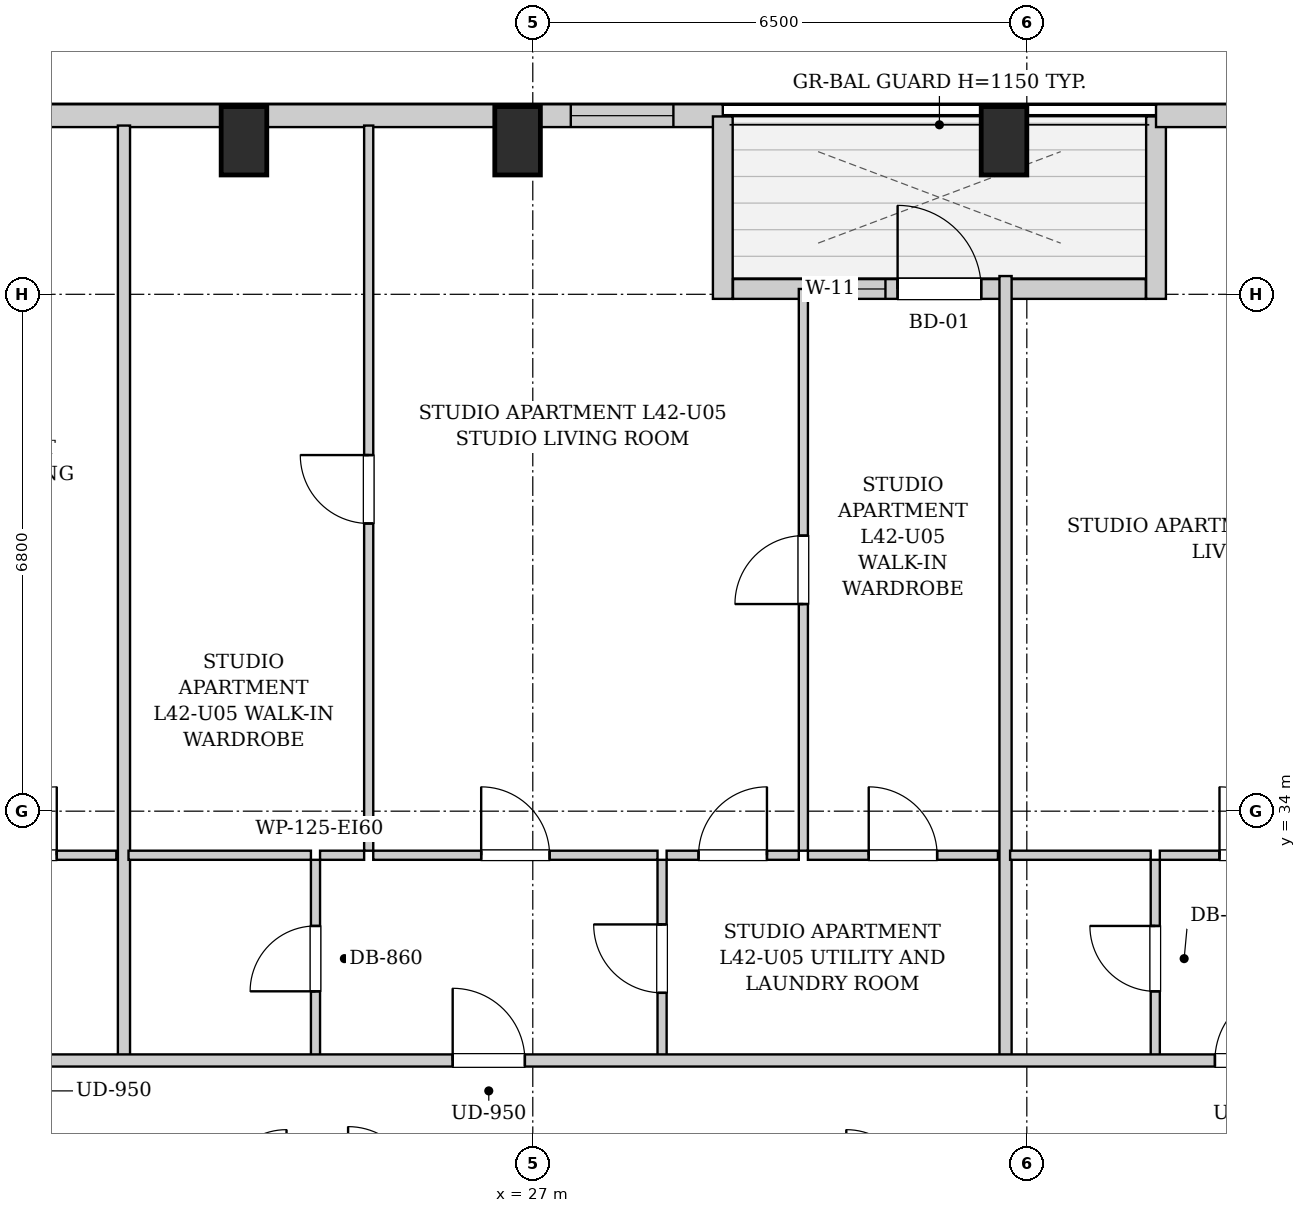
"""IFC4 building model, lengths in metres.
Left out: names, types, materials, properties, quantities, classifications, styles, units other than length and angle.
Written with IfcOpenShell. Run it as: python <this file> out.ifc"""

import sys

from ifc_helpers import new_model, si_unit, direction, frame, frame_2d, origin, origin_2d, place, context, subcontext, project, spatial, rectangle, extrude, element, fill, save


model = new_model("IFC4")
c1 = context("Model", 3, precision=1e-05, world=origin(), true_north=direction((0.0, 1.0)))
c2 = subcontext(c1, "Body", "Model", "MODEL_VIEW")
j1 = project(units=[si_unit("LENGTHUNIT", "METRE"), si_unit("PLANEANGLEUNIT", "RADIAN")], contexts=[c1])
p1 = place(None, origin())
s1 = spatial("IfcSite", under=j1, at=p1, CompositionType="ELEMENT")
p2 = place(p1, origin())
s2 = spatial("IfcBuilding", under=s1, at=p2, CompositionType="ELEMENT")
p3 = place(p2, frame((0.0, 0.0, 147.15)))
s3 = spatial("IfcBuildingStorey", under=s2, at=p3, CompositionType="ELEMENT", Elevation=147.15)
for number, where, z_axis, x_axis in (
    (1, (23.2, 42.82, 0.0), (0.0, 0.0, 1.0), (1.0, 0.0, 0.0)),
    (2, (26.8, 42.82, 0.0), (0.0, 0.0, 1.0), (1.0, 0.0, 0.0)),
    (3, (33.2, 42.82, 0.0), (0.0, 0.0, 1.0), (1.0, 0.0, 0.0)),
):
    element("IfcColumn", number, at=place(p3, frame(where, z_axis=z_axis, x_axis=x_axis)), inside=s3, PredefinedType="COLUMN", context=c2, shape_type="SweptSolid", body=[
        extrude(rectangle(XDim=0.6, YDim=0.9, at=origin_2d()), origin(), (0.0, 0.0, 1.0), 3.25),
    ])
p4 = place(p3, frame((10.0, 43.15, 0.0), z_axis=(0.0, 0.0, 1.0), x_axis=(1.0, 0.0, 0.0)))
e4 = element("IfcWall", 4, at=p4, inside=s3, PredefinedType="SOLIDWALL", context=c2, shape_type="SweptSolid", body=[
    extrude(rectangle(XDim=19.5, YDim=0.3, at=frame_2d((9.75, 0.0))), origin(), (0.0, 0.0, 1.0), 2.99),
])
p5 = place(p4, frame((2.39, 0.0, 0.55)))
e5 = element("IfcOpeningElement", 5, at=p5, cuts=e4, PredefinedType="OPENING", context=c2, shape_type="SweptSolid", body=[
    extrude(rectangle(XDim=1.35, YDim=1.2, at=frame_2d((0.675, 0.6))), frame((0.0, 0.16, 0.0), z_axis=(0.0, -1.0, 0.0), x_axis=(1.0, 0.0, 0.0)), (0.0, 0.0, 1.0), 0.32),
])
p6 = place(p4, frame((4.66, 0.0, 0.55)))
e6 = element("IfcOpeningElement", 6, at=p6, cuts=e4, PredefinedType="OPENING", context=c2, shape_type="SweptSolid", body=[
    extrude(rectangle(XDim=1.35, YDim=1.2, at=frame_2d((0.675, 0.6))), frame((0.0, 0.16, 0.0), z_axis=(0.0, -1.0, 0.0), x_axis=(1.0, 0.0, 0.0)), (0.0, 0.0, 1.0), 0.32),
])
p7 = place(p4, frame((8.625, 0.0, 0.55)))
e7 = element("IfcOpeningElement", 7, at=p7, cuts=e4, PredefinedType="OPENING", context=c2, shape_type="SweptSolid", body=[
    extrude(rectangle(XDim=1.35, YDim=1.2, at=frame_2d((0.675, 0.6))), frame((0.0, 0.16, 0.0), z_axis=(0.0, -1.0, 0.0), x_axis=(1.0, 0.0, 0.0)), (0.0, 0.0, 1.0), 0.32),
])
p8 = place(p4, frame((17.5, 0.0, 0.55)))
e8 = element("IfcOpeningElement", 8, at=p8, cuts=e4, PredefinedType="OPENING", context=c2, shape_type="SweptSolid", body=[
    extrude(rectangle(XDim=1.35, YDim=1.2, at=frame_2d((0.675, 0.6))), frame((0.0, 0.16, 0.0), z_axis=(0.0, -1.0, 0.0), x_axis=(1.0, 0.0, 0.0)), (0.0, 0.0, 1.0), 0.32),
])
p9 = place(p3, frame((29.5, 43.14, 0.0), z_axis=(0.0, 0.0, 1.0), x_axis=(0.0, -1.0, 0.0)))
e9 = element("IfcWall", 9, at=p9, inside=s3, PredefinedType="SOLIDWALL", context=c2, shape_type="SweptSolid", body=[
    extrude(rectangle(XDim=2.4, YDim=0.26, at=frame_2d((1.2, 0.0))), origin(), (0.0, 0.0, 1.0), 2.99),
])
p10 = place(p3, frame((29.634, 40.87, 0.0), z_axis=(0.0, 0.0, 1.0), x_axis=(1.0, 0.0, 0.0)))
e10 = element("IfcWall", 10, at=p10, inside=s3, PredefinedType="SOLIDWALL", context=c2, shape_type="SweptSolid", body=[
    extrude(rectangle(XDim=5.432, YDim=0.26, at=frame_2d((2.716, 0.0))), origin(), (0.0, 0.0, 1.0), 2.99),
])
p11 = place(p10, frame((2.166, 0.0, 0.0)))
e11 = element("IfcOpeningElement", 11, at=p11, cuts=e10, PredefinedType="OPENING", context=c2, shape_type="SweptSolid", body=[
    extrude(rectangle(XDim=1.1, YDim=2.0, at=frame_2d((0.55, 1.0))), frame((0.0, 0.14, 0.0), z_axis=(0.0, -1.0, 0.0), x_axis=(1.0, 0.0, 0.0)), (0.0, 0.0, 1.0), 0.28),
])
p12 = place(p10, frame((1.156, 0.0, 0.55)))
e12 = element("IfcOpeningElement", 12, at=p12, cuts=e10, PredefinedType="OPENING", context=c2, shape_type="SweptSolid", body=[
    extrude(rectangle(XDim=0.85, YDim=1.2, at=frame_2d((0.425, 0.6))), frame((0.0, 0.14, 0.0), z_axis=(0.0, -1.0, 0.0), x_axis=(1.0, 0.0, 0.0)), (0.0, 0.0, 1.0), 0.28),
])
p13 = place(p3, frame((35.2, 40.74, 0.0), z_axis=(0.0, 0.0, 1.0), x_axis=(0.0, 1.0, 0.0)))
e13 = element("IfcWall", 13, at=p13, inside=s3, PredefinedType="SOLIDWALL", context=c2, shape_type="SweptSolid", body=[
    extrude(rectangle(XDim=2.4, YDim=0.26, at=frame_2d((1.2, 0.0))), origin(), (0.0, 0.0, 1.0), 2.99),
])
p14 = place(p3, frame((35.2, 43.15, 0.0), z_axis=(0.0, 0.0, 1.0), x_axis=(1.0, 0.0, 0.0)))
e14 = element("IfcWall", 14, at=p14, inside=s3, PredefinedType="SOLIDWALL", context=c2, shape_type="SweptSolid", body=[
    extrude(rectangle(XDim=2.6, YDim=0.3, at=frame_2d((1.3, 0.0))), origin(), (0.0, 0.0, 1.0), 2.99),
])
p15 = place(p3, frame((19.054, 33.42, 0.0), z_axis=(0.0, 0.0, 1.0), x_axis=(1.0, 0.0, 0.0)))
e15 = element("IfcWall", 15, at=p15, inside=s3, PredefinedType="PARTITIONING", context=c2, shape_type="SweptSolid", body=[
    extrude(rectangle(XDim=2.467, YDim=0.12, at=frame_2d((1.233, 0.0))), origin(), (0.0, 0.0, 1.0), 2.99),
])
p16 = place(p15, frame((0.783, 0.0, 0.0)))
e16 = element("IfcOpeningElement", 16, at=p16, cuts=e15, PredefinedType="OPENING", context=c2, shape_type="SweptSolid", body=[
    extrude(rectangle(XDim=0.9, YDim=2.05, at=frame_2d((0.45, 1.025))), frame((0.0, 0.07, 0.0), z_axis=(0.0, -1.0, 0.0), x_axis=(1.0, 0.0, 0.0)), (0.0, 0.0, 1.0), 0.14),
])
p17 = place(p3, frame((21.621, 30.76, 0.0), z_axis=(0.0, 0.0, 1.0), x_axis=(0.0, 1.0, 0.0)))
e17 = element("IfcWall", 17, at=p17, inside=s3, PredefinedType="PARTITIONING", context=c2, shape_type="SweptSolid", body=[
    extrude(rectangle(XDim=12.26, YDim=0.16, at=frame_2d((6.13, 0.0))), origin(), (0.0, 0.0, 1.0), 2.99),
])
p18 = place(p3, frame((24.141, 30.76, 0.0), z_axis=(0.0, 0.0, 1.0), x_axis=(0.0, 1.0, 0.0)))
e18 = element("IfcWall", 18, at=p18, inside=s3, PredefinedType="PARTITIONING", context=c2, shape_type="SweptSolid", body=[
    extrude(rectangle(XDim=2.6, YDim=0.12, at=frame_2d((1.3, 0.0))), origin(), (0.0, 0.0, 1.0), 2.99),
])
p19 = place(p18, frame((0.87, 0.0, 0.0)))
e19 = element("IfcOpeningElement", 19, at=p19, cuts=e18, PredefinedType="OPENING", context=c2, shape_type="SweptSolid", body=[
    extrude(rectangle(XDim=0.86, YDim=2.05, at=frame_2d((0.43, 1.025))), frame((0.0, 0.07, 0.0), z_axis=(0.0, -1.0, 0.0), x_axis=(1.0, 0.0, 0.0)), (0.0, 0.0, 1.0), 0.14),
])
p20 = place(p3, frame((21.681, 33.42, 0.0), z_axis=(0.0, 0.0, 1.0), x_axis=(1.0, 0.0, 0.0)))
e20 = element("IfcWall", 20, at=p20, inside=s3, PredefinedType="PARTITIONING", context=c2, shape_type="SweptSolid", body=[
    extrude(rectangle(XDim=2.4, YDim=0.12, at=frame_2d((1.2, 0.0))), origin(), (0.0, 0.0, 1.0), 2.99),
])
p21 = place(p3, frame((28.701, 30.76, 0.0), z_axis=(0.0, 0.0, 1.0), x_axis=(0.0, 1.0, 0.0)))
e21 = element("IfcWall", 21, at=p21, inside=s3, PredefinedType="PARTITIONING", context=c2, shape_type="SweptSolid", body=[
    extrude(rectangle(XDim=2.6, YDim=0.12, at=frame_2d((1.3, 0.0))), origin(), (0.0, 0.0, 1.0), 2.99),
])
p22 = place(p21, frame((0.85, 0.0, 0.0)))
e22 = element("IfcOpeningElement", 22, at=p22, cuts=e21, PredefinedType="OPENING", context=c2, shape_type="SweptSolid", body=[
    extrude(rectangle(XDim=0.9, YDim=2.05, at=frame_2d((0.45, 1.025))), frame((0.0, 0.07, 0.0), z_axis=(0.0, -1.0, 0.0), x_axis=(1.0, 0.0, 0.0)), (0.0, 0.0, 1.0), 0.14),
])
p23 = place(p3, frame((24.201, 33.42, 0.0), z_axis=(0.0, 0.0, 1.0), x_axis=(1.0, 0.0, 0.0)))
e23 = element("IfcWall", 23, at=p23, inside=s3, PredefinedType="PARTITIONING", context=c2, shape_type="SweptSolid", body=[
    extrude(rectangle(XDim=0.58, YDim=0.12, at=frame_2d((0.29, 0.0))), origin(), (0.0, 0.0, 1.0), 2.99),
])
p24 = place(p3, frame((24.901, 33.42, 0.0), z_axis=(0.0, 0.0, 1.0), x_axis=(1.0, 0.0, 0.0)))
e24 = element("IfcWall", 24, at=p24, inside=s3, PredefinedType="PARTITIONING", context=c2, shape_type="SweptSolid", body=[
    extrude(rectangle(XDim=3.74, YDim=0.12, at=frame_2d((1.87, 0.0))), origin(), (0.0, 0.0, 1.0), 2.99),
])
p25 = place(p24, frame((1.42, 0.0, 0.0)))
e25 = element("IfcOpeningElement", 25, at=p25, cuts=e24, PredefinedType="OPENING", context=c2, shape_type="SweptSolid", body=[
    extrude(rectangle(XDim=0.9, YDim=2.05, at=frame_2d((0.45, 1.025))), frame((0.0, 0.07, 0.0), z_axis=(0.0, -1.0, 0.0), x_axis=(1.0, 0.0, 0.0)), (0.0, 0.0, 1.0), 0.14),
])
p26 = place(p3, frame((28.761, 33.42, 0.0), z_axis=(0.0, 0.0, 1.0), x_axis=(1.0, 0.0, 0.0)))
e26 = element("IfcWall", 26, at=p26, inside=s3, PredefinedType="PARTITIONING", context=c2, shape_type="SweptSolid", body=[
    extrude(rectangle(XDim=1.739, YDim=0.12, at=frame_2d((0.87, 0.0))), origin(), (0.0, 0.0, 1.0), 2.99),
])
p27 = place(p26, frame((0.42, 0.0, 0.0)))
e27 = element("IfcOpeningElement", 27, at=p27, cuts=e26, PredefinedType="OPENING", context=c2, shape_type="SweptSolid", body=[
    extrude(rectangle(XDim=0.9, YDim=2.05, at=frame_2d((0.45, 1.025))), frame((0.0, 0.07, 0.0), z_axis=(0.0, -1.0, 0.0), x_axis=(1.0, 0.0, 0.0)), (0.0, 0.0, 1.0), 0.14),
])
p28 = place(p3, frame((30.62, 33.42, 0.0), z_axis=(0.0, 0.0, 1.0), x_axis=(1.0, 0.0, 0.0)))
e28 = element("IfcWall", 28, at=p28, inside=s3, PredefinedType="PARTITIONING", context=c2, shape_type="SweptSolid", body=[
    extrude(rectangle(XDim=2.5, YDim=0.12, at=frame_2d((1.25, 0.0))), origin(), (0.0, 0.0, 1.0), 2.99),
])
p29 = place(p28, frame((0.8, 0.0, 0.0)))
e29 = element("IfcOpeningElement", 29, at=p29, cuts=e28, PredefinedType="OPENING", context=c2, shape_type="SweptSolid", body=[
    extrude(rectangle(XDim=0.9, YDim=2.05, at=frame_2d((0.45, 1.025))), frame((0.0, 0.07, 0.0), z_axis=(0.0, -1.0, 0.0), x_axis=(1.0, 0.0, 0.0)), (0.0, 0.0, 1.0), 0.14),
])
p30 = place(p3, frame((24.841, 33.48, 0.0), z_axis=(0.0, 0.0, 1.0), x_axis=(0.0, 1.0, 0.0)))
e30 = element("IfcWall", 30, at=p30, inside=s3, PredefinedType="PARTITIONING", context=c2, shape_type="SweptSolid", body=[
    extrude(rectangle(XDim=9.54, YDim=0.12, at=frame_2d((4.77, 0.0))), origin(), (0.0, 0.0, 1.0), 2.99),
])
p31 = place(p30, frame((4.305, 0.0, 0.0)))
e31 = element("IfcOpeningElement", 31, at=p31, cuts=e30, PredefinedType="OPENING", context=c2, shape_type="SweptSolid", body=[
    extrude(rectangle(XDim=0.9, YDim=2.05, at=frame_2d((0.45, 1.025))), frame((0.0, 0.07, 0.0), z_axis=(0.0, -1.0, 0.0), x_axis=(1.0, 0.0, 0.0)), (0.0, 0.0, 1.0), 0.14),
])
p32 = place(p3, frame((30.56, 33.48, 0.0), z_axis=(0.0, 0.0, 1.0), x_axis=(0.0, 1.0, 0.0)))
e32 = element("IfcWall", 32, at=p32, inside=s3, PredefinedType="PARTITIONING", context=c2, shape_type="SweptSolid", body=[
    extrude(rectangle(XDim=7.39, YDim=0.12, at=frame_2d((3.695, 0.0))), origin(), (0.0, 0.0, 1.0), 2.99),
])
p33 = place(p32, frame((3.245, 0.0, 0.0)))
e33 = element("IfcOpeningElement", 33, at=p33, cuts=e32, PredefinedType="OPENING", context=c2, shape_type="SweptSolid", body=[
    extrude(rectangle(XDim=0.9, YDim=2.05, at=frame_2d((0.45, 1.025))), frame((0.0, 0.07, 0.0), z_axis=(0.0, -1.0, 0.0), x_axis=(1.0, 0.0, 0.0)), (0.0, 0.0, 1.0), 0.14),
])
p34 = place(p3, frame((33.22, 30.76, 0.0), z_axis=(0.0, 0.0, 1.0), x_axis=(0.0, 1.0, 0.0)))
e34 = element("IfcWall", 34, at=p34, inside=s3, PredefinedType="PARTITIONING", context=c2, shape_type="SweptSolid", body=[
    extrude(rectangle(XDim=10.28, YDim=0.16, at=frame_2d((5.14, 0.0))), origin(), (0.0, 0.0, 1.0), 2.442),
])
p35 = place(p3, frame((35.19, 30.76, 0.0), z_axis=(0.0, 0.0, 1.0), x_axis=(0.0, 1.0, 0.0)))
e35 = element("IfcWall", 35, at=p35, inside=s3, PredefinedType="PARTITIONING", context=c2, shape_type="SweptSolid", body=[
    extrude(rectangle(XDim=2.6, YDim=0.12, at=frame_2d((1.3, 0.0))), origin(), (0.0, 0.0, 1.0), 2.99),
])
p36 = place(p35, frame((0.87, 0.0, 0.0)))
e36 = element("IfcOpeningElement", 36, at=p36, cuts=e35, PredefinedType="OPENING", context=c2, shape_type="SweptSolid", body=[
    extrude(rectangle(XDim=0.86, YDim=2.05, at=frame_2d((0.43, 1.025))), frame((0.0, 0.07, 0.0), z_axis=(0.0, -1.0, 0.0), x_axis=(1.0, 0.0, 0.0)), (0.0, 0.0, 1.0), 0.14),
])
p37 = place(p3, frame((33.28, 33.42, 0.0), z_axis=(0.0, 0.0, 1.0), x_axis=(1.0, 0.0, 0.0)))
e37 = element("IfcWall", 37, at=p37, inside=s3, PredefinedType="PARTITIONING", context=c2, shape_type="SweptSolid", body=[
    extrude(rectangle(XDim=1.85, YDim=0.12, at=frame_2d((0.925, 0.0))), origin(), (0.0, 0.0, 1.0), 2.99),
])
p38 = place(p3, frame((35.25, 33.42, 0.0), z_axis=(0.0, 0.0, 1.0), x_axis=(1.0, 0.0, 0.0)))
e38 = element("IfcWall", 38, at=p38, inside=s3, PredefinedType="PARTITIONING", context=c2, shape_type="SweptSolid", body=[
    extrude(rectangle(XDim=2.47, YDim=0.12, at=frame_2d((1.235, 0.0))), origin(), (0.0, 0.0, 1.0), 2.99),
])
p39 = place(p38, frame((0.785, 0.0, 0.0)))
e39 = element("IfcOpeningElement", 39, at=p39, cuts=e38, PredefinedType="OPENING", context=c2, shape_type="SweptSolid", body=[
    extrude(rectangle(XDim=0.9, YDim=2.05, at=frame_2d((0.45, 1.025))), frame((0.0, 0.07, 0.0), z_axis=(0.0, -1.0, 0.0), x_axis=(1.0, 0.0, 0.0)), (0.0, 0.0, 1.0), 0.14),
])
p40 = place(p3, frame((10.05, 30.72, 0.0), z_axis=(0.0, 0.0, 1.0), x_axis=(1.0, 0.0, 0.0)))
e40 = element("IfcWall", 40, at=p40, inside=s3, PredefinedType="PARTITIONING", context=c2, shape_type="SweptSolid", body=[
    extrude(rectangle(XDim=27.7, YDim=0.16, at=frame_2d((13.85, 0.0))), origin(), (0.0, 0.0, 1.0), 2.99),
])
p41 = place(p40, frame((4.063, 0.0, 0.0)))
e41 = element("IfcOpeningElement", 41, at=p41, cuts=e40, PredefinedType="OPENING", context=c2, shape_type="SweptSolid", body=[
    extrude(rectangle(XDim=0.95, YDim=2.1, at=frame_2d((0.475, 1.05))), frame((0.0, 0.09, 0.0), z_axis=(0.0, -1.0, 0.0), x_axis=(1.0, 0.0, 0.0)), (0.0, 0.0, 1.0), 0.18),
])
p42 = place(p40, frame((9.515, 0.0, 0.0)))
e42 = element("IfcOpeningElement", 42, at=p42, cuts=e40, PredefinedType="OPENING", context=c2, shape_type="SweptSolid", body=[
    extrude(rectangle(XDim=0.95, YDim=2.1, at=frame_2d((0.475, 1.05))), frame((0.0, 0.09, 0.0), z_axis=(0.0, -1.0, 0.0), x_axis=(1.0, 0.0, 0.0)), (0.0, 0.0, 1.0), 0.18),
])
p43 = place(p40, frame((15.896, 0.0, 0.0)))
e43 = element("IfcOpeningElement", 43, at=p43, cuts=e40, PredefinedType="OPENING", context=c2, shape_type="SweptSolid", body=[
    extrude(rectangle(XDim=0.95, YDim=2.1, at=frame_2d((0.475, 1.05))), frame((0.0, 0.09, 0.0), z_axis=(0.0, -1.0, 0.0), x_axis=(1.0, 0.0, 0.0)), (0.0, 0.0, 1.0), 0.18),
])
p44 = place(p40, frame((25.925, 0.0, 0.0)))
e44 = element("IfcOpeningElement", 44, at=p44, cuts=e40, PredefinedType="OPENING", context=c2, shape_type="SweptSolid", body=[
    extrude(rectangle(XDim=0.95, YDim=2.1, at=frame_2d((0.475, 1.05))), frame((0.0, 0.09, 0.0), z_axis=(0.0, -1.0, 0.0), x_axis=(1.0, 0.0, 0.0)), (0.0, 0.0, 1.0), 0.18),
])
p45 = place(p16, origin())
e45 = element("IfcDoor", 45, at=p45, inside=s3, OperationType="SINGLE_SWING_RIGHT", PredefinedType="DOOR", context=c2, shape_type="SweptSolid", body=[
    extrude(rectangle(XDim=0.9, YDim=2.05, at=frame_2d((0.45, 1.025))), frame((0.0, 0.025, 0.0), z_axis=(0.0, -1.0, 0.0), x_axis=(1.0, 0.0, 0.0)), (0.0, 0.0, 1.0), 0.05),
])
fill(e16, e45)
p46 = place(p19, origin())
e46 = element("IfcDoor", 46, at=p46, inside=s3, OperationType="SINGLE_SWING_LEFT", PredefinedType="DOOR", context=c2, shape_type="SweptSolid", body=[
    extrude(rectangle(XDim=0.86, YDim=2.05, at=frame_2d((0.43, 1.025))), frame((0.0, 0.025, 0.0), z_axis=(0.0, -1.0, 0.0), x_axis=(1.0, 0.0, 0.0)), (0.0, 0.0, 1.0), 0.05),
])
fill(e19, e46)
p47 = place(p22, origin())
e47 = element("IfcDoor", 47, at=p47, inside=s3, OperationType="SINGLE_SWING_RIGHT", PredefinedType="DOOR", context=c2, shape_type="SweptSolid", body=[
    extrude(rectangle(XDim=0.9, YDim=2.05, at=frame_2d((0.45, 1.025))), frame((0.0, 0.025, 0.0), z_axis=(0.0, -1.0, 0.0), x_axis=(1.0, 0.0, 0.0)), (0.0, 0.0, 1.0), 0.05),
])
fill(e22, e47)
p48 = place(p25, origin())
e48 = element("IfcDoor", 48, at=p48, inside=s3, OperationType="SINGLE_SWING_LEFT", PredefinedType="DOOR", context=c2, shape_type="SweptSolid", body=[
    extrude(rectangle(XDim=0.9, YDim=2.05, at=frame_2d((0.45, 1.025))), frame((0.0, 0.025, 0.0), z_axis=(0.0, -1.0, 0.0), x_axis=(1.0, 0.0, 0.0)), (0.0, 0.0, 1.0), 0.05),
])
fill(e25, e48)
p49 = place(p27, origin())
e49 = element("IfcDoor", 49, at=p49, inside=s3, OperationType="SINGLE_SWING_RIGHT", PredefinedType="DOOR", context=c2, shape_type="SweptSolid", body=[
    extrude(rectangle(XDim=0.9, YDim=2.05, at=frame_2d((0.45, 1.025))), frame((0.0, 0.025, 0.0), z_axis=(0.0, -1.0, 0.0), x_axis=(1.0, 0.0, 0.0)), (0.0, 0.0, 1.0), 0.05),
])
fill(e27, e49)
p50 = place(p29, origin())
e50 = element("IfcDoor", 50, at=p50, inside=s3, OperationType="SINGLE_SWING_LEFT", PredefinedType="DOOR", context=c2, shape_type="SweptSolid", body=[
    extrude(rectangle(XDim=0.9, YDim=2.05, at=frame_2d((0.45, 1.025))), frame((0.0, 0.025, 0.0), z_axis=(0.0, -1.0, 0.0), x_axis=(1.0, 0.0, 0.0)), (0.0, 0.0, 1.0), 0.05),
])
fill(e29, e50)
p51 = place(p31, origin())
e51 = element("IfcDoor", 51, at=p51, inside=s3, OperationType="SINGLE_SWING_RIGHT", PredefinedType="DOOR", context=c2, shape_type="SweptSolid", body=[
    extrude(rectangle(XDim=0.9, YDim=2.05, at=frame_2d((0.45, 1.025))), frame((0.0, 0.025, 0.0), z_axis=(0.0, -1.0, 0.0), x_axis=(1.0, 0.0, 0.0)), (0.0, 0.0, 1.0), 0.05),
])
fill(e31, e51)
p52 = place(p33, origin())
e52 = element("IfcDoor", 52, at=p52, inside=s3, OperationType="SINGLE_SWING_LEFT", PredefinedType="DOOR", context=c2, shape_type="SweptSolid", body=[
    extrude(rectangle(XDim=0.9, YDim=2.05, at=frame_2d((0.45, 1.025))), frame((0.0, 0.025, 0.0), z_axis=(0.0, -1.0, 0.0), x_axis=(1.0, 0.0, 0.0)), (0.0, 0.0, 1.0), 0.05),
])
fill(e33, e52)
p53 = place(p36, origin())
e53 = element("IfcDoor", 53, at=p53, inside=s3, OperationType="SINGLE_SWING_RIGHT", PredefinedType="DOOR", context=c2, shape_type="SweptSolid", body=[
    extrude(rectangle(XDim=0.86, YDim=2.05, at=frame_2d((0.43, 1.025))), frame((0.0, 0.025, 0.0), z_axis=(0.0, -1.0, 0.0), x_axis=(1.0, 0.0, 0.0)), (0.0, 0.0, 1.0), 0.05),
])
fill(e36, e53)
p54 = place(p39, origin())
e54 = element("IfcDoor", 54, at=p54, inside=s3, OperationType="SINGLE_SWING_LEFT", PredefinedType="DOOR", context=c2, shape_type="SweptSolid", body=[
    extrude(rectangle(XDim=0.9, YDim=2.05, at=frame_2d((0.45, 1.025))), frame((0.0, 0.025, 0.0), z_axis=(0.0, -1.0, 0.0), x_axis=(1.0, 0.0, 0.0)), (0.0, 0.0, 1.0), 0.05),
])
fill(e39, e54)
p55 = place(p43, origin())
e55 = element("IfcDoor", 55, at=p55, inside=s3, OperationType="SINGLE_SWING_LEFT", PredefinedType="DOOR", context=c2, shape_type="SweptSolid", body=[
    extrude(rectangle(XDim=0.95, YDim=2.1, at=frame_2d((0.475, 1.05))), frame((0.0, 0.025, 0.0), z_axis=(0.0, -1.0, 0.0), x_axis=(1.0, 0.0, 0.0)), (0.0, 0.0, 1.0), 0.05),
])
fill(e43, e55)
p56 = place(p44, origin())
e56 = element("IfcDoor", 56, at=p56, inside=s3, OperationType="SINGLE_SWING_RIGHT", PredefinedType="DOOR", context=c2, shape_type="SweptSolid", body=[
    extrude(rectangle(XDim=0.95, YDim=2.1, at=frame_2d((0.475, 1.05))), frame((0.0, 0.025, 0.0), z_axis=(0.0, -1.0, 0.0), x_axis=(1.0, 0.0, 0.0)), (0.0, 0.0, 1.0), 0.05),
])
fill(e44, e56)
p57 = place(p11, origin())
e57 = element("IfcDoor", 57, at=p57, inside=s3, OperationType="SINGLE_SWING_LEFT", PredefinedType="DOOR", context=c2, shape_type="SweptSolid", body=[
    extrude(rectangle(XDim=1.1, YDim=2.0, at=frame_2d((0.55, 1.0))), frame((0.0, 0.025, 0.0), z_axis=(0.0, -1.0, 0.0), x_axis=(1.0, 0.0, 0.0)), (0.0, 0.0, 1.0), 0.05),
])
fill(e11, e57)
p58 = place(p8, origin())
e58 = element("IfcWindow", 58, at=p58, inside=s3, PartitioningType="SINGLE_PANEL", PredefinedType="WINDOW", context=c2, shape_type="SweptSolid", body=[
    extrude(rectangle(XDim=1.35, YDim=1.2, at=frame_2d((0.675, 0.6))), frame((0.0, 0.03, 0.0), z_axis=(0.0, -1.0, 0.0), x_axis=(1.0, 0.0, 0.0)), (0.0, 0.0, 1.0), 0.06),
])
fill(e8, e58)
p59 = place(p12, origin())
e59 = element("IfcWindow", 59, at=p59, inside=s3, PartitioningType="SINGLE_PANEL", PredefinedType="WINDOW", context=c2, shape_type="SweptSolid", body=[
    extrude(rectangle(XDim=0.85, YDim=1.2, at=frame_2d((0.425, 0.6))), frame((0.0, 0.03, 0.0), z_axis=(0.0, -1.0, 0.0), x_axis=(1.0, 0.0, 0.0)), (0.0, 0.0, 1.0), 0.06),
])
fill(e12, e59)
save(model, sys.argv[1])
